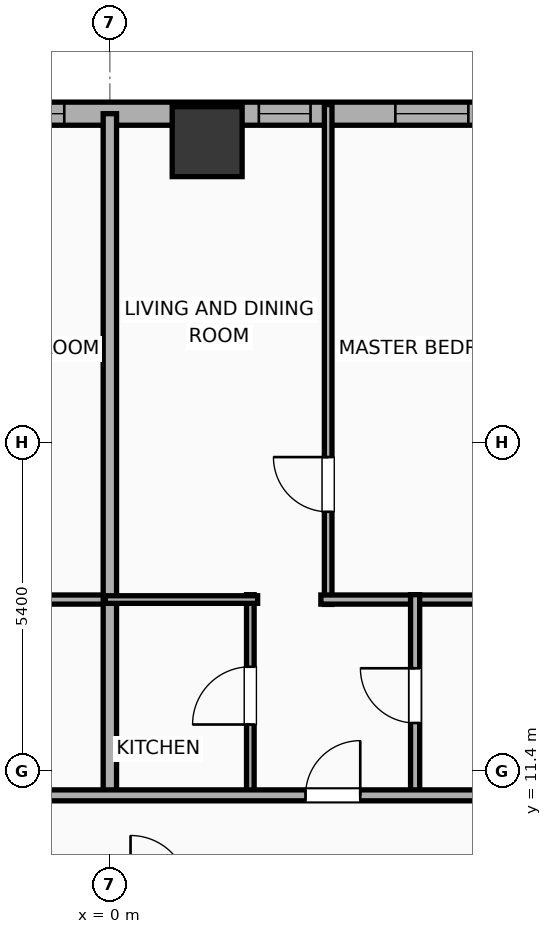
"""IFC4 building model, lengths in metres.
Left out: names, types, materials, properties, quantities, classifications, styles, units other than length and angle.
Written with IfcOpenShell. Run it as: python <this file> out.ifc"""

import sys

from ifc_helpers import new_model, si_unit, direction, frame, frame_2d, origin, origin_2d, place, context, subcontext, project, spatial, rectangle, hollow_rectangle, extrude, element, fill, save


model = new_model("IFC4")
c1 = context("Model", 3, precision=1e-05, world=origin(), true_north=direction((0.0, 1.0)))
c2 = subcontext(c1, "Body", "Model", "MODEL_VIEW")
j1 = project(units=[si_unit("LENGTHUNIT", "METRE"), si_unit("PLANEANGLEUNIT", "RADIAN")], contexts=[c1])
p1 = place(None, origin())
s1 = spatial("IfcSite", under=j1, at=p1, CompositionType="ELEMENT")
p2 = place(p1, origin())
s2 = spatial("IfcBuilding", under=s1, at=p2, CompositionType="ELEMENT")
p3 = place(p2, frame((0.0, 0.0, 65.0)))
s3 = spatial("IfcBuildingStorey", under=s2, at=p3, CompositionType="ELEMENT", Elevation=65.0)
p4 = place(p3, frame((1.6, 21.75, 0.0), z_axis=(0.0, 0.0, 1.0), x_axis=(1.0, 0.0, 0.0)))
e1 = element("IfcColumn", 1, at=p4, inside=s3, PredefinedType="COLUMN", context=c2, shape_type="SweptSolid", body=[
    extrude(hollow_rectangle(XDim=1.15, YDim=1.15, WallThickness=0.04, at=origin_2d()), origin(), (0.0, 0.0, 1.0), 3.9),
])
p5 = place(p3, frame((-29.581, 22.21, 0.0), z_axis=(0.0, 0.0, 1.0), x_axis=(1.0, 0.0, 0.0)))
e2 = element("IfcWall", 2, at=p5, inside=s3, PredefinedType="ELEMENTEDWALL", context=c2, shape_type="SweptSolid", body=[
    extrude(rectangle(XDim=51.963, YDim=0.38, at=frame_2d((25.981, 0.0))), origin(), (0.0, 0.0, 1.0), 3.65),
])
p6 = place(p5, frame((5.81, 0.0, 0.75)))
e3 = element("IfcOpeningElement", 3, at=p6, cuts=e2, PredefinedType="OPENING", context=c2, shape_type="SweptSolid", body=[
    extrude(rectangle(XDim=2.4, YDim=2.1, at=frame_2d((1.2, 1.05))), frame((0.0, 0.2, 0.0), z_axis=(0.0, -1.0, 0.0), x_axis=(1.0, 0.0, 0.0)), (0.0, 0.0, 1.0), 0.4),
])
p7 = place(p5, frame((26.431, 0.0, 0.75)))
e4 = element("IfcOpeningElement", 4, at=p7, cuts=e2, PredefinedType="OPENING", context=c2, shape_type="SweptSolid", body=[
    extrude(rectangle(XDim=2.4, YDim=2.1, at=frame_2d((1.2, 1.05))), frame((0.0, 0.2, 0.0), z_axis=(0.0, -1.0, 0.0), x_axis=(1.0, 0.0, 0.0)), (0.0, 0.0, 1.0), 0.4),
])
p8 = place(p5, frame((43.752, 0.0, 0.75)))
e5 = element("IfcOpeningElement", 5, at=p8, cuts=e2, PredefinedType="OPENING", context=c2, shape_type="SweptSolid", body=[
    extrude(rectangle(XDim=2.4, YDim=2.1, at=frame_2d((1.2, 1.05))), frame((0.0, 0.2, 0.0), z_axis=(0.0, -1.0, 0.0), x_axis=(1.0, 0.0, 0.0)), (0.0, 0.0, 1.0), 0.4),
])
p9 = place(p5, frame((1.163, 0.0, 0.75)))
e6 = element("IfcOpeningElement", 6, at=p9, cuts=e2, PredefinedType="OPENING", context=c2, shape_type="SweptSolid", body=[
    extrude(rectangle(XDim=1.2, YDim=2.05, at=frame_2d((0.6, 1.025))), frame((0.0, 0.2, 0.0), z_axis=(0.0, -1.0, 0.0), x_axis=(1.0, 0.0, 0.0)), (0.0, 0.0, 1.0), 0.4),
])
p10 = place(p5, frame((3.251, 0.0, 0.75)))
e7 = element("IfcOpeningElement", 7, at=p10, cuts=e2, PredefinedType="OPENING", context=c2, shape_type="SweptSolid", body=[
    extrude(rectangle(XDim=1.2, YDim=2.05, at=frame_2d((0.6, 1.025))), frame((0.0, 0.2, 0.0), z_axis=(0.0, -1.0, 0.0), x_axis=(1.0, 0.0, 0.0)), (0.0, 0.0, 1.0), 0.4),
])
p11 = place(p5, frame((11.745, 0.0, 0.75)))
e8 = element("IfcOpeningElement", 8, at=p11, cuts=e2, PredefinedType="OPENING", context=c2, shape_type="SweptSolid", body=[
    extrude(rectangle(XDim=1.2, YDim=2.05, at=frame_2d((0.6, 1.025))), frame((0.0, 0.2, 0.0), z_axis=(0.0, -1.0, 0.0), x_axis=(1.0, 0.0, 0.0)), (0.0, 0.0, 1.0), 0.4),
])
p12 = place(p5, frame((16.776, 0.0, 0.75)))
e9 = element("IfcOpeningElement", 9, at=p12, cuts=e2, PredefinedType="OPENING", context=c2, shape_type="SweptSolid", body=[
    extrude(rectangle(XDim=1.2, YDim=2.05, at=frame_2d((0.6, 1.025))), frame((0.0, 0.2, 0.0), z_axis=(0.0, -1.0, 0.0), x_axis=(1.0, 0.0, 0.0)), (0.0, 0.0, 1.0), 0.4),
])
p13 = place(p5, frame((21.531, 0.0, 0.75)))
e10 = element("IfcOpeningElement", 10, at=p13, cuts=e2, PredefinedType="OPENING", context=c2, shape_type="SweptSolid", body=[
    extrude(rectangle(XDim=0.85, YDim=2.05, at=frame_2d((0.425, 1.025))), frame((0.0, 0.2, 0.0), z_axis=(0.0, -1.0, 0.0), x_axis=(1.0, 0.0, 0.0)), (0.0, 0.0, 1.0), 0.4),
])
p14 = place(p5, frame((23.776, 0.0, 0.75)))
e11 = element("IfcOpeningElement", 11, at=p14, cuts=e2, PredefinedType="OPENING", context=c2, shape_type="SweptSolid", body=[
    extrude(rectangle(XDim=1.2, YDim=2.05, at=frame_2d((0.6, 1.025))), frame((0.0, 0.2, 0.0), z_axis=(0.0, -1.0, 0.0), x_axis=(1.0, 0.0, 0.0)), (0.0, 0.0, 1.0), 0.4),
])
p15 = place(p5, frame((32.031, 0.0, 0.75)))
e12 = element("IfcOpeningElement", 12, at=p15, cuts=e2, PredefinedType="OPENING", context=c2, shape_type="SweptSolid", body=[
    extrude(rectangle(XDim=0.85, YDim=2.05, at=frame_2d((0.425, 1.025))), frame((0.0, 0.2, 0.0), z_axis=(0.0, -1.0, 0.0), x_axis=(1.0, 0.0, 0.0)), (0.0, 0.0, 1.0), 0.4),
])
p16 = place(p5, frame((34.276, 0.0, 0.75)))
e13 = element("IfcOpeningElement", 13, at=p16, cuts=e2, PredefinedType="OPENING", context=c2, shape_type="SweptSolid", body=[
    extrude(rectangle(XDim=1.2, YDim=2.05, at=frame_2d((0.6, 1.025))), frame((0.0, 0.2, 0.0), z_axis=(0.0, -1.0, 0.0), x_axis=(1.0, 0.0, 0.0)), (0.0, 0.0, 1.0), 0.4),
])
p17 = place(p5, frame((37.776, 0.0, 0.75)))
e14 = element("IfcOpeningElement", 14, at=p17, cuts=e2, PredefinedType="OPENING", context=c2, shape_type="SweptSolid", body=[
    extrude(rectangle(XDim=1.2, YDim=2.05, at=frame_2d((0.6, 1.025))), frame((0.0, 0.2, 0.0), z_axis=(0.0, -1.0, 0.0), x_axis=(1.0, 0.0, 0.0)), (0.0, 0.0, 1.0), 0.4),
])
p18 = place(p5, frame((42.411, 0.0, 0.75)))
e15 = element("IfcOpeningElement", 15, at=p18, cuts=e2, PredefinedType="OPENING", context=c2, shape_type="SweptSolid", body=[
    extrude(rectangle(XDim=0.85, YDim=2.05, at=frame_2d((0.425, 1.025))), frame((0.0, 0.2, 0.0), z_axis=(0.0, -1.0, 0.0), x_axis=(1.0, 0.0, 0.0)), (0.0, 0.0, 1.0), 0.4),
])
p19 = place(p5, frame((47.791, 0.0, 0.75)))
e16 = element("IfcOpeningElement", 16, at=p19, cuts=e2, PredefinedType="OPENING", context=c2, shape_type="SweptSolid", body=[
    extrude(rectangle(XDim=1.2, YDim=2.05, at=frame_2d((0.6, 1.025))), frame((0.0, 0.2, 0.0), z_axis=(0.0, -1.0, 0.0), x_axis=(1.0, 0.0, 0.0)), (0.0, 0.0, 1.0), 0.4),
])
p20 = place(p5, frame((49.901, 0.0, 0.75)))
e17 = element("IfcOpeningElement", 17, at=p20, cuts=e2, PredefinedType="OPENING", context=c2, shape_type="SweptSolid", body=[
    extrude(rectangle(XDim=1.2, YDim=2.05, at=frame_2d((0.6, 1.025))), frame((0.0, 0.2, 0.0), z_axis=(0.0, -1.0, 0.0), x_axis=(1.0, 0.0, 0.0)), (0.0, 0.0, 1.0), 0.4),
])
p21 = place(p3, frame((-3.53, 14.22, 0.0), z_axis=(0.0, 0.0, 1.0), x_axis=(1.0, 0.0, 0.0)))
e18 = element("IfcWall", 18, at=p21, inside=s3, PredefinedType="PLUMBINGWALL", context=c2, shape_type="SweptSolid", body=[
    extrude(rectangle(XDim=3.605, YDim=0.15, at=frame_2d((1.802, 0.0))), origin(), (0.0, 0.0, 1.0), 3.65),
])
p22 = place(p3, frame((0.0, 10.92, 0.0), z_axis=(0.0, 0.0, 1.0), x_axis=(0.0, 1.0, 0.0)))
e19 = element("IfcWall", 19, at=p22, inside=s3, PredefinedType="PARTITIONING", context=c2, shape_type="SweptSolid", body=[
    extrude(rectangle(XDim=11.29, YDim=0.22, at=frame_2d((5.645, 0.0))), origin(), (0.0, 0.0, 1.0), 3.65),
])
p23 = place(p3, frame((3.59, 14.14, 0.0), z_axis=(0.0, 0.0, 1.0), x_axis=(0.0, 1.0, 0.0)))
e20 = element("IfcWall", 20, at=p23, inside=s3, PredefinedType="PARTITIONING", context=c2, shape_type="SweptSolid", body=[
    extrude(rectangle(XDim=8.22, YDim=0.125, at=frame_2d((4.11, 0.0))), origin(), (0.0, 0.0, 1.0), 3.65),
])
p24 = place(p23, frame((1.523, 0.0, 0.0)))
e21 = element("IfcOpeningElement", 21, at=p24, cuts=e20, PredefinedType="OPENING", context=c2, shape_type="SweptSolid", body=[
    extrude(rectangle(XDim=0.9, YDim=2.05, at=frame_2d((0.45, 1.025))), frame((0.0, 0.073, 0.0), z_axis=(0.0, -1.0, 0.0), x_axis=(1.0, 0.0, 0.0)), (0.0, 0.0, 1.0), 0.145),
])
p25 = place(p3, frame((3.47, 14.22, 0.0), z_axis=(0.0, 0.0, 1.0), x_axis=(1.0, 0.0, 0.0)))
e22 = element("IfcWall", 22, at=p25, inside=s3, PredefinedType="PLUMBINGWALL", context=c2, shape_type="SweptSolid", body=[
    extrude(rectangle(XDim=3.605, YDim=0.15, at=frame_2d((1.802, 0.0))), origin(), (0.0, 0.0, 1.0), 3.65),
])
p26 = place(p3, frame((2.31, 10.98, 0.0), z_axis=(0.0, 0.0, 1.0), x_axis=(0.0, 1.0, 0.0)))
e23 = element("IfcWall", 23, at=p26, inside=s3, PredefinedType="PARTITIONING", context=c2, shape_type="SweptSolid", body=[
    extrude(rectangle(XDim=3.32, YDim=0.125, at=frame_2d((1.66, 0.0))), origin(), (0.0, 0.0, 1.0), 3.65),
])
p27 = place(p26, frame((1.185, 0.0, 0.0)))
e24 = element("IfcOpeningElement", 24, at=p27, cuts=e23, PredefinedType="OPENING", context=c2, shape_type="SweptSolid", body=[
    extrude(rectangle(XDim=0.95, YDim=2.05, at=frame_2d((0.475, 1.025))), frame((0.0, 0.073, 0.0), z_axis=(0.0, -1.0, 0.0), x_axis=(1.0, 0.0, 0.0)), (0.0, 0.0, 1.0), 0.145),
])
p28 = place(p3, frame((-0.075, 14.22, 0.0), z_axis=(0.0, 0.0, 1.0), x_axis=(1.0, 0.0, 0.0)))
e25 = element("IfcWall", 25, at=p28, inside=s3, PredefinedType="PARTITIONING", context=c2, shape_type="SweptSolid", body=[
    extrude(rectangle(XDim=2.505, YDim=0.125, at=frame_2d((1.252, 0.0))), origin(), (0.0, 0.0, 1.0), 3.65),
])
p29 = place(p3, frame((5.02, 10.98, 0.0), z_axis=(0.0, 0.0, 1.0), x_axis=(0.0, 1.0, 0.0)))
e26 = element("IfcWall", 26, at=p29, inside=s3, PredefinedType="PLUMBINGWALL", context=c2, shape_type="SweptSolid", body=[
    extrude(rectangle(XDim=3.32, YDim=0.15, at=frame_2d((1.66, 0.0))), origin(), (0.0, 0.0, 1.0), 3.65),
])
p30 = place(p29, frame((1.21, 0.0, 0.0)))
e27 = element("IfcOpeningElement", 27, at=p30, cuts=e26, PredefinedType="OPENING", context=c2, shape_type="SweptSolid", body=[
    extrude(rectangle(XDim=0.9, YDim=2.05, at=frame_2d((0.45, 1.025))), frame((0.0, 0.085, 0.0), z_axis=(0.0, -1.0, 0.0), x_axis=(1.0, 0.0, 0.0)), (0.0, 0.0, 1.0), 0.17),
])
p31 = place(p3, frame((-33.41, 11.0, 0.0), z_axis=(0.0, 0.0, 1.0), x_axis=(1.0, 0.0, 0.0)))
e28 = element("IfcWall", 28, at=p31, inside=s3, PredefinedType="PARTITIONING", context=c2, shape_type="SweptSolid", body=[
    extrude(rectangle(XDim=59.62, YDim=0.18, at=frame_2d((29.81, 0.0))), origin(), (0.0, 0.0, 1.0), 3.65),
])
p32 = place(p31, frame((2.913, 0.0, 0.0)))
e29 = element("IfcOpeningElement", 29, at=p32, cuts=e28, PredefinedType="OPENING", context=c2, shape_type="SweptSolid", body=[
    extrude(rectangle(XDim=0.9, YDim=2.05, at=frame_2d((0.45, 1.025))), frame((0.0, 0.1, 0.0), z_axis=(0.0, -1.0, 0.0), x_axis=(1.0, 0.0, 0.0)), (0.0, 0.0, 1.0), 0.2),
])
p33 = place(p31, frame((10.312, 0.0, 0.0)))
e30 = element("IfcOpeningElement", 30, at=p33, cuts=e28, PredefinedType="OPENING", context=c2, shape_type="SweptSolid", body=[
    extrude(rectangle(XDim=1.15, YDim=2.05, at=frame_2d((0.575, 1.025))), frame((0.0, 0.1, 0.0), z_axis=(0.0, -1.0, 0.0), x_axis=(1.0, 0.0, 0.0)), (0.0, 0.0, 1.0), 0.2),
])
p34 = place(p31, frame((15.85, 0.0, 0.0)))
e31 = element("IfcOpeningElement", 31, at=p34, cuts=e28, PredefinedType="OPENING", context=c2, shape_type="SweptSolid", body=[
    extrude(rectangle(XDim=0.9, YDim=2.05, at=frame_2d((0.45, 1.025))), frame((0.0, 0.1, 0.0), z_axis=(0.0, -1.0, 0.0), x_axis=(1.0, 0.0, 0.0)), (0.0, 0.0, 1.0), 0.2),
])
p35 = place(p31, frame((22.623, 0.0, 0.0)))
e32 = element("IfcOpeningElement", 32, at=p35, cuts=e28, PredefinedType="OPENING", context=c2, shape_type="SweptSolid", body=[
    extrude(rectangle(XDim=0.9, YDim=2.05, at=frame_2d((0.45, 1.025))), frame((0.0, 0.1, 0.0), z_axis=(0.0, -1.0, 0.0), x_axis=(1.0, 0.0, 0.0)), (0.0, 0.0, 1.0), 0.2),
])
p36 = place(p31, frame((29.622, 0.0, 0.0)))
e33 = element("IfcOpeningElement", 33, at=p36, cuts=e28, PredefinedType="OPENING", context=c2, shape_type="SweptSolid", body=[
    extrude(rectangle(XDim=0.9, YDim=2.05, at=frame_2d((0.45, 1.025))), frame((0.0, 0.1, 0.0), z_axis=(0.0, -1.0, 0.0), x_axis=(1.0, 0.0, 0.0)), (0.0, 0.0, 1.0), 0.2),
])
p37 = place(p31, frame((36.628, 0.0, 0.0)))
e34 = element("IfcOpeningElement", 34, at=p37, cuts=e28, PredefinedType="OPENING", context=c2, shape_type="SweptSolid", body=[
    extrude(rectangle(XDim=0.9, YDim=2.05, at=frame_2d((0.45, 1.025))), frame((0.0, 0.1, 0.0), z_axis=(0.0, -1.0, 0.0), x_axis=(1.0, 0.0, 0.0)), (0.0, 0.0, 1.0), 0.2),
])
p38 = place(p31, frame((43.627, 0.0, 0.0)))
e35 = element("IfcOpeningElement", 35, at=p38, cuts=e28, PredefinedType="OPENING", context=c2, shape_type="SweptSolid", body=[
    extrude(rectangle(XDim=0.9, YDim=2.05, at=frame_2d((0.45, 1.025))), frame((0.0, 0.1, 0.0), z_axis=(0.0, -1.0, 0.0), x_axis=(1.0, 0.0, 0.0)), (0.0, 0.0, 1.0), 0.2),
])
p39 = place(p31, frame((48.617, 0.0, 0.0)))
e36 = element("IfcOpeningElement", 36, at=p39, cuts=e28, PredefinedType="OPENING", context=c2, shape_type="SweptSolid", body=[
    extrude(rectangle(XDim=1.15, YDim=2.05, at=frame_2d((0.575, 1.025))), frame((0.0, 0.1, 0.0), z_axis=(0.0, -1.0, 0.0), x_axis=(1.0, 0.0, 0.0)), (0.0, 0.0, 1.0), 0.2),
])
p40 = place(p31, frame((56.272, 0.0, 0.0)))
e37 = element("IfcOpeningElement", 37, at=p40, cuts=e28, PredefinedType="OPENING", context=c2, shape_type="SweptSolid", body=[
    extrude(rectangle(XDim=0.9, YDim=2.05, at=frame_2d((0.45, 1.025))), frame((0.0, 0.1, 0.0), z_axis=(0.0, -1.0, 0.0), x_axis=(1.0, 0.0, 0.0)), (0.0, 0.0, 1.0), 0.2),
])
p41 = place(p7, origin())
e38 = element("IfcWindow", 38, at=p41, inside=s3, PartitioningType="SINGLE_PANEL", PredefinedType="WINDOW", context=c2, shape_type="SweptSolid", body=[
    extrude(rectangle(XDim=2.4, YDim=2.1, at=frame_2d((1.2, 1.05))), frame((0.0, 0.03, 0.0), z_axis=(0.0, -1.0, 0.0), x_axis=(1.0, 0.0, 0.0)), (0.0, 0.0, 1.0), 0.06),
])
fill(e4, e38)
p42 = place(p15, origin())
e39 = element("IfcWindow", 39, at=p42, inside=s3, PartitioningType="SINGLE_PANEL", PredefinedType="WINDOW", context=c2, shape_type="SweptSolid", body=[
    extrude(rectangle(XDim=0.85, YDim=2.05, at=frame_2d((0.425, 1.025))), frame((0.0, 0.03, 0.0), z_axis=(0.0, -1.0, 0.0), x_axis=(1.0, 0.0, 0.0)), (0.0, 0.0, 1.0), 0.06),
])
fill(e12, e39)
p43 = place(p16, origin())
e40 = element("IfcWindow", 40, at=p43, inside=s3, PartitioningType="SINGLE_PANEL", PredefinedType="WINDOW", context=c2, shape_type="SweptSolid", body=[
    extrude(rectangle(XDim=1.2, YDim=2.05, at=frame_2d((0.6, 1.025))), frame((0.0, 0.03, 0.0), z_axis=(0.0, -1.0, 0.0), x_axis=(1.0, 0.0, 0.0)), (0.0, 0.0, 1.0), 0.06),
])
fill(e13, e40)
p44 = place(p24, origin())
e41 = element("IfcDoor", 41, at=p44, inside=s3, OperationType="SINGLE_SWING_RIGHT", PredefinedType="DOOR", context=c2, shape_type="SweptSolid", body=[
    extrude(rectangle(XDim=0.9, YDim=2.05, at=frame_2d((0.45, 1.025))), frame((0.0, 0.025, 0.0), z_axis=(0.0, -1.0, 0.0), x_axis=(1.0, 0.0, 0.0)), (0.0, 0.0, 1.0), 0.05),
])
fill(e21, e41)
p45 = place(p27, origin())
e42 = element("IfcDoor", 42, at=p45, inside=s3, OperationType="SINGLE_SWING_LEFT", PredefinedType="DOOR", context=c2, shape_type="SweptSolid", body=[
    extrude(rectangle(XDim=0.95, YDim=2.05, at=frame_2d((0.475, 1.025))), frame((0.0, 0.025, 0.0), z_axis=(0.0, -1.0, 0.0), x_axis=(1.0, 0.0, 0.0)), (0.0, 0.0, 1.0), 0.05),
])
fill(e24, e42)
p46 = place(p30, origin())
e43 = element("IfcDoor", 43, at=p46, inside=s3, OperationType="SINGLE_SWING_RIGHT", PredefinedType="DOOR", context=c2, shape_type="SweptSolid", body=[
    extrude(rectangle(XDim=0.9, YDim=2.05, at=frame_2d((0.45, 1.025))), frame((0.0, 0.025, 0.0), z_axis=(0.0, -1.0, 0.0), x_axis=(1.0, 0.0, 0.0)), (0.0, 0.0, 1.0), 0.05),
])
fill(e27, e43)
p47 = place(p37, origin())
e44 = element("IfcDoor", 44, at=p47, inside=s3, OperationType="SINGLE_SWING_RIGHT", PredefinedType="DOOR", context=c2, shape_type="SweptSolid", body=[
    extrude(rectangle(XDim=0.9, YDim=2.05, at=frame_2d((0.45, 1.025))), frame((0.0, 0.025, 0.0), z_axis=(0.0, -1.0, 0.0), x_axis=(1.0, 0.0, 0.0)), (0.0, 0.0, 1.0), 0.05),
])
fill(e34, e44)
save(model, sys.argv[1])
